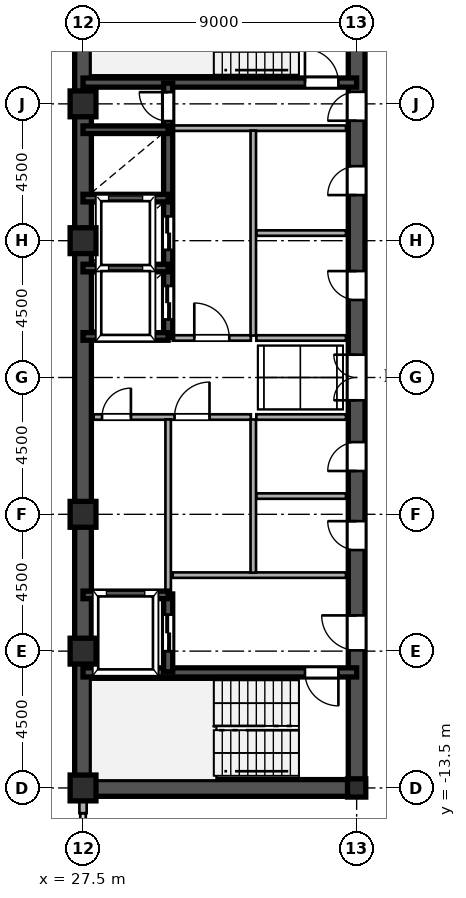
"""IFC4 building model, lengths in metres.
Left out: names, types, materials, properties, quantities, classifications, styles, units other than length and angle.
Written with IfcOpenShell. Run it as: python <this file> out.ifc"""

import sys

from ifc_helpers import new_model, si_unit, direction, frame, frame_2d, origin, origin_2d, place, context, subcontext, project, spatial, rectangle, hollow_rectangle, i_section, extrude, source, transform, mapped, element, fill, save


model = new_model("IFC4")
c1 = context("Model", 3, precision=1e-05, world=origin(), true_north=direction((0.0, 1.0)))
c2 = subcontext(c1, "Body", "Model", "MODEL_VIEW")
j1 = project(units=[si_unit("LENGTHUNIT", "METRE"), si_unit("PLANEANGLEUNIT", "RADIAN")], contexts=[c1])
p1 = place(None, origin())
s1 = spatial("IfcSite", under=j1, at=p1, CompositionType="ELEMENT")
p2 = place(p1, origin())
s2 = spatial("IfcBuilding", under=s1, at=p2, CompositionType="ELEMENT")
p3 = place(p2, frame((0.0, 0.0, 181.5)))
s3 = spatial("IfcBuildingStorey", under=s2, at=p3, CompositionType="ELEMENT", Elevation=181.5)
m1 = source(origin(), c2, "Body", "SweptSolid", [
    extrude(hollow_rectangle(XDim=0.85, YDim=0.85, WallThickness=0.036, at=origin_2d()), origin(), (0.0, 0.0, 1.0), 3.6),
])
for number, where, z_axis, x_axis in (
    (1, (27.5, -13.5, 0.0), (0.0, 0.0, 1.0), (1.0, 0.0, 0.0)),
    (2, (27.5, -9.0, 0.0), (0.0, 0.0, 1.0), (1.0, 0.0, 0.0)),
    (3, (27.5, -4.5, 0.0), (0.0, 0.0, 1.0), (1.0, 0.0, 0.0)),
    (4, (27.5, 4.5, 0.0), (0.0, 0.0, 1.0), (1.0, 0.0, 0.0)),
    (5, (27.5, 9.0, 0.0), (0.0, 0.0, 1.0), (1.0, 0.0, 0.0)),
):
    element("IfcColumn", number, at=place(p3, frame(where, z_axis=z_axis, x_axis=x_axis)), inside=s3, PredefinedType="COLUMN", context=c2, shape_type="MappedRepresentation", body=[
        mapped(m1, transform((0.0, 0.0, 0.0), scale=1.0)),
    ])
m2 = source(origin(), c2, "Body", "SweptSolid", [
    extrude(i_section(OverallWidth=0.6, OverallDepth=0.6, WebThickness=0.025, FlangeThickness=0.04, at=origin_2d()), origin(), (0.0, 0.0, 1.0), 3.6),
])
p4 = place(p3, frame((36.5, -13.5, 0.0), z_axis=(0.0, 0.0, 1.0), x_axis=(1.0, 0.0, 0.0)))
e6 = element("IfcColumn", 6, at=p4, inside=s3, PredefinedType="COLUMN", context=c2, shape_type="MappedRepresentation", body=[
    mapped(m2, transform((0.0, 0.0, 0.0), scale=1.0)),
])
p5 = place(p3, frame((27.5, -14.33, 0.0), z_axis=(0.0, 0.0, 1.0), x_axis=(0.0, 1.0, 0.0)))
e7 = element("IfcWall", 7, at=p5, inside=s3, PredefinedType="SOLIDWALL", context=c2, shape_type="SweptSolid", body=[
    extrude(rectangle(XDim=0.55, YDim=0.24, at=frame_2d((0.275, 0.0))), origin(), (0.0, 0.0, 1.0), 2.88),
])
for number, where, z_axis, x_axis in (
    (8, (27.5, -13.5, 0.0), (0.0, 0.0, 1.0), (0.0, 1.0, 0.0)),
    (9, (27.5, 1.3, 0.0), (0.0, 0.0, 1.0), (0.0, 1.0, 0.0)),
):
    element("IfcWall", number, at=place(p3, frame(where, z_axis=z_axis, x_axis=x_axis)), inside=s3, PredefinedType="SHEAR", context=c2, shape_type="SweptSolid", body=[
        extrude(rectangle(XDim=12.2, YDim=0.55, at=frame_2d((6.1, 0.0))), origin(), (0.0, 0.0, 1.0), 3.38),
    ])
p6 = place(p3, frame((27.5, -1.3, 0.0), z_axis=(0.0, 0.0, 1.0), x_axis=(0.0, 1.0, 0.0)))
e10 = element("IfcWall", 10, at=p6, inside=s3, PredefinedType="SHEAR", context=c2, shape_type="SweptSolid", body=[
    extrude(rectangle(XDim=2.6, YDim=0.55, at=frame_2d((1.3, 0.0))), origin(), (0.0, 0.0, 1.0), 3.38),
])
p7 = place(p3, frame((27.5, -13.5, 0.0), z_axis=(0.0, 0.0, 1.0), x_axis=(1.0, 0.0, 0.0)))
e11 = element("IfcWall", 11, at=p7, inside=s3, PredefinedType="SHEAR", context=c2, shape_type="SweptSolid", body=[
    extrude(rectangle(XDim=9.0, YDim=0.55, at=frame_2d((4.5, 0.0))), origin(), (0.0, 0.0, 1.0), 3.38),
])
p8 = place(p3, frame((36.5, -13.65, 0.0), z_axis=(0.0, 0.0, 1.0), x_axis=(0.0, 1.0, 0.0)))
e12 = element("IfcWall", 12, at=p8, inside=s3, PredefinedType="SHEAR", context=c2, shape_type="SweptSolid", body=[
    extrude(rectangle(XDim=7.15, YDim=0.55, at=frame_2d((3.575, 0.0))), origin(), (0.0, 0.0, 1.0), 3.38),
])
p9 = place(p8, frame((4.675, 0.0, 0.0)))
e13 = element("IfcOpeningElement", 13, at=p9, cuts=e12, PredefinedType="OPENING", context=c2, shape_type="SweptSolid", body=[
    extrude(rectangle(XDim=1.15, YDim=2.2, at=frame_2d((0.575, 1.1))), frame((0.0, 0.285, 0.0), z_axis=(0.0, -1.0, 0.0), x_axis=(1.0, 0.0, 0.0)), (0.0, 0.0, 1.0), 0.57),
])
p10 = place(p3, frame((36.5, -1.3, 0.0), z_axis=(0.0, 0.0, 1.0), x_axis=(0.0, 1.0, 0.0)))
e14 = element("IfcWall", 14, at=p10, inside=s3, PredefinedType="SHEAR", context=c2, shape_type="SweptSolid", body=[
    extrude(rectangle(XDim=2.6, YDim=0.55, at=frame_2d((1.3, 0.0))), origin(), (0.0, 0.0, 1.0), 3.38),
])
p11 = place(p10, frame((0.55, 0.0, 0.0)))
e15 = element("IfcOpeningElement", 15, at=p11, cuts=e14, PredefinedType="OPENING", context=c2, shape_type="SweptSolid", body=[
    extrude(rectangle(XDim=1.5, YDim=2.3, at=frame_2d((0.75, 1.15))), frame((0.0, 0.285, 0.0), z_axis=(0.0, -1.0, 0.0), x_axis=(1.0, 0.0, 0.0)), (0.0, 0.0, 1.0), 0.57),
])
p12 = place(p3, frame((36.5, 8.2, 0.0), z_axis=(0.0, 0.0, 1.0), x_axis=(0.0, 1.0, 0.0)))
e16 = element("IfcWall", 16, at=p12, inside=s3, PredefinedType="SHEAR", context=c2, shape_type="SweptSolid", body=[
    extrude(rectangle(XDim=5.45, YDim=0.55, at=frame_2d((2.725, 0.0))), origin(), (0.0, 0.0, 1.0), 3.38),
])
p13 = place(p12, frame((0.245, 0.0, 0.0)))
e17 = element("IfcOpeningElement", 17, at=p13, cuts=e16, PredefinedType="OPENING", context=c2, shape_type="SweptSolid", body=[
    extrude(rectangle(XDim=0.95, YDim=2.15, at=frame_2d((0.475, 1.075))), frame((0.0, 0.285, 0.0), z_axis=(0.0, -1.0, 0.0), x_axis=(1.0, 0.0, 0.0)), (0.0, 0.0, 1.0), 0.57),
])
p14 = place(p3, frame((36.5, -6.5, 0.0), z_axis=(0.0, 0.0, 1.0), x_axis=(0.0, 1.0, 0.0)))
e18 = element("IfcWall", 18, at=p14, inside=s3, PredefinedType="SHEAR", context=c2, shape_type="SweptSolid", body=[
    extrude(rectangle(XDim=2.6, YDim=0.55, at=frame_2d((1.3, 0.0))), origin(), (0.0, 0.0, 1.0), 3.38),
])
p15 = place(p14, frame((0.825, 0.0, 0.0)))
e19 = element("IfcOpeningElement", 19, at=p15, cuts=e18, PredefinedType="OPENING", context=c2, shape_type="SweptSolid", body=[
    extrude(rectangle(XDim=0.95, YDim=2.15, at=frame_2d((0.475, 1.075))), frame((0.0, 0.285, 0.0), z_axis=(0.0, -1.0, 0.0), x_axis=(1.0, 0.0, 0.0)), (0.0, 0.0, 1.0), 0.57),
])
p16 = place(p3, frame((36.5, -3.9, 0.0), z_axis=(0.0, 0.0, 1.0), x_axis=(0.0, 1.0, 0.0)))
e20 = element("IfcWall", 20, at=p16, inside=s3, PredefinedType="SHEAR", context=c2, shape_type="SweptSolid", body=[
    extrude(rectangle(XDim=2.6, YDim=0.55, at=frame_2d((1.3, 0.0))), origin(), (0.0, 0.0, 1.0), 3.38),
])
p17 = place(p16, frame((0.825, 0.0, 0.0)))
e21 = element("IfcOpeningElement", 21, at=p17, cuts=e20, PredefinedType="OPENING", context=c2, shape_type="SweptSolid", body=[
    extrude(rectangle(XDim=0.95, YDim=2.15, at=frame_2d((0.475, 1.075))), frame((0.0, 0.285, 0.0), z_axis=(0.0, -1.0, 0.0), x_axis=(1.0, 0.0, 0.0)), (0.0, 0.0, 1.0), 0.57),
])
p18 = place(p3, frame((36.5, 1.3, 0.0), z_axis=(0.0, 0.0, 1.0), x_axis=(0.0, 1.0, 0.0)))
e22 = element("IfcWall", 22, at=p18, inside=s3, PredefinedType="SHEAR", context=c2, shape_type="SweptSolid", body=[
    extrude(rectangle(XDim=3.45, YDim=0.55, at=frame_2d((1.725, 0.0))), origin(), (0.0, 0.0, 1.0), 3.38),
])
p19 = place(p18, frame((1.25, 0.0, 0.0)))
e23 = element("IfcOpeningElement", 23, at=p19, cuts=e22, PredefinedType="OPENING", context=c2, shape_type="SweptSolid", body=[
    extrude(rectangle(XDim=0.95, YDim=2.15, at=frame_2d((0.475, 1.075))), frame((0.0, 0.285, 0.0), z_axis=(0.0, -1.0, 0.0), x_axis=(1.0, 0.0, 0.0)), (0.0, 0.0, 1.0), 0.57),
])
p20 = place(p3, frame((36.5, 4.75, 0.0), z_axis=(0.0, 0.0, 1.0), x_axis=(0.0, 1.0, 0.0)))
e24 = element("IfcWall", 24, at=p20, inside=s3, PredefinedType="SHEAR", context=c2, shape_type="SweptSolid", body=[
    extrude(rectangle(XDim=3.45, YDim=0.55, at=frame_2d((1.725, 0.0))), origin(), (0.0, 0.0, 1.0), 3.38),
])
p21 = place(p20, frame((1.25, 0.0, 0.0)))
e25 = element("IfcOpeningElement", 25, at=p21, cuts=e24, PredefinedType="OPENING", context=c2, shape_type="SweptSolid", body=[
    extrude(rectangle(XDim=0.95, YDim=2.15, at=frame_2d((0.475, 1.075))), frame((0.0, 0.285, 0.0), z_axis=(0.0, -1.0, 0.0), x_axis=(1.0, 0.0, 0.0)), (0.0, 0.0, 1.0), 0.57),
])
p22 = place(p3, frame((27.5, -9.7, 0.0), z_axis=(0.0, 0.0, 1.0), x_axis=(1.0, 0.0, 0.0)))
e26 = element("IfcWall", 26, at=p22, inside=s3, PredefinedType="SHEAR", context=c2, shape_type="SweptSolid", body=[
    extrude(rectangle(XDim=9.0, YDim=0.3, at=frame_2d((4.5, 0.0))), origin(), (0.0, 0.0, 1.0), 3.38),
])
p23 = place(p22, frame((7.3, 0.0, 0.0)))
e27 = element("IfcOpeningElement", 27, at=p23, cuts=e26, PredefinedType="OPENING", context=c2, shape_type="SweptSolid", body=[
    extrude(rectangle(XDim=1.1, YDim=2.2, at=frame_2d((0.55, 1.1))), frame((0.0, 0.16, 0.0), z_axis=(0.0, -1.0, 0.0), x_axis=(1.0, 0.0, 0.0)), (0.0, 0.0, 1.0), 0.32),
])
p24 = place(p3, frame((27.5, 9.7, 0.0), z_axis=(0.0, 0.0, 1.0), x_axis=(1.0, 0.0, 0.0)))
e28 = element("IfcWall", 28, at=p24, inside=s3, PredefinedType="SHEAR", context=c2, shape_type="SweptSolid", body=[
    extrude(rectangle(XDim=9.0, YDim=0.3, at=frame_2d((4.5, 0.0))), origin(), (0.0, 0.0, 1.0), 3.38),
])
p25 = place(p24, frame((7.3, 0.0, 0.0)))
e29 = element("IfcOpeningElement", 29, at=p25, cuts=e28, PredefinedType="OPENING", context=c2, shape_type="SweptSolid", body=[
    extrude(rectangle(XDim=1.1, YDim=2.2, at=frame_2d((0.55, 1.1))), frame((0.0, 0.16, 0.0), z_axis=(0.0, -1.0, 0.0), x_axis=(1.0, 0.0, 0.0)), (0.0, 0.0, 1.0), 0.32),
])
for number, where, z_axis, x_axis in (
    (30, (27.5, -7.15, 0.0), (0.0, 0.0, 1.0), (1.0, 0.0, 0.0)),
    (31, (27.5, 1.35, 0.0), (0.0, 0.0, 1.0), (1.0, 0.0, 0.0)),
    (32, (27.5, 3.6, 0.0), (0.0, 0.0, 1.0), (1.0, 0.0, 0.0)),
    (33, (27.5, 5.9, 0.0), (0.0, 0.0, 1.0), (1.0, 0.0, 0.0)),
    (34, (27.5, 8.15, 0.0), (0.0, 0.0, 1.0), (1.0, 0.0, 0.0)),
):
    element("IfcWall", number, at=place(p3, frame(where, z_axis=z_axis, x_axis=x_axis)), inside=s3, PredefinedType="SHEAR", context=c2, shape_type="SweptSolid", body=[
        extrude(rectangle(XDim=2.8, YDim=0.25, at=frame_2d((1.4, 0.0))), origin(), (0.0, 0.0, 1.0), 3.38),
    ])
p26 = place(p3, frame((30.3, -9.68, 0.0), z_axis=(0.0, 0.0, 1.0), x_axis=(0.0, 1.0, 0.0)))
e35 = element("IfcWall", 35, at=p26, inside=s3, PredefinedType="SHEAR", context=c2, shape_type="SweptSolid", body=[
    extrude(rectangle(XDim=2.56, YDim=0.3, at=frame_2d((1.28, 0.0))), origin(), (0.0, 0.0, 1.0), 3.38),
])
p27 = place(p26, frame((0.68, 0.0, 0.0)))
e36 = element("IfcOpeningElement", 36, at=p27, cuts=e35, PredefinedType="OPENING", context=c2, shape_type="SweptSolid", body=[
    extrude(rectangle(XDim=1.2, YDim=2.25, at=frame_2d((0.6, 1.125))), frame((0.0, 0.16, 0.0), z_axis=(0.0, -1.0, 0.0), x_axis=(1.0, 0.0, 0.0)), (0.0, 0.0, 1.0), 0.32),
])
p28 = place(p3, frame((30.3, 1.32, 0.0), z_axis=(0.0, 0.0, 1.0), x_axis=(0.0, 1.0, 0.0)))
e37 = element("IfcWall", 37, at=p28, inside=s3, PredefinedType="SHEAR", context=c2, shape_type="SweptSolid", body=[
    extrude(rectangle(XDim=2.28, YDim=0.3, at=frame_2d((1.14, 0.0))), origin(), (0.0, 0.0, 1.0), 3.38),
])
p29 = place(p28, frame((0.59, 0.0, 0.0)))
e38 = element("IfcOpeningElement", 38, at=p29, cuts=e37, PredefinedType="OPENING", context=c2, shape_type="SweptSolid", body=[
    extrude(rectangle(XDim=1.1, YDim=2.2, at=frame_2d((0.55, 1.1))), frame((0.0, 0.16, 0.0), z_axis=(0.0, -1.0, 0.0), x_axis=(1.0, 0.0, 0.0)), (0.0, 0.0, 1.0), 0.32),
])
p30 = place(p3, frame((30.3, 3.6, 0.0), z_axis=(0.0, 0.0, 1.0), x_axis=(0.0, 1.0, 0.0)))
e39 = element("IfcWall", 39, at=p30, inside=s3, PredefinedType="SHEAR", context=c2, shape_type="SweptSolid", body=[
    extrude(rectangle(XDim=2.3, YDim=0.3, at=frame_2d((1.15, 0.0))), origin(), (0.0, 0.0, 1.0), 3.38),
])
p31 = place(p30, frame((0.6, 0.0, 0.0)))
e40 = element("IfcOpeningElement", 40, at=p31, cuts=e39, PredefinedType="OPENING", context=c2, shape_type="SweptSolid", body=[
    extrude(rectangle(XDim=1.1, YDim=2.2, at=frame_2d((0.55, 1.1))), frame((0.0, 0.16, 0.0), z_axis=(0.0, -1.0, 0.0), x_axis=(1.0, 0.0, 0.0)), (0.0, 0.0, 1.0), 0.32),
])
p32 = place(p3, frame((30.3, 5.9, 0.0), z_axis=(0.0, 0.0, 1.0), x_axis=(0.0, 1.0, 0.0)))
e41 = element("IfcWall", 41, at=p32, inside=s3, PredefinedType="SHEAR", context=c2, shape_type="SweptSolid", body=[
    extrude(rectangle(XDim=2.25, YDim=0.3, at=frame_2d((1.125, 0.0))), origin(), (0.0, 0.0, 1.0), 3.38),
])
p33 = place(p3, frame((30.3, 8.15, 0.0), z_axis=(0.0, 0.0, 1.0), x_axis=(0.0, 1.0, 0.0)))
e42 = element("IfcWall", 42, at=p33, inside=s3, PredefinedType="SHEAR", context=c2, shape_type="SweptSolid", body=[
    extrude(rectangle(XDim=1.53, YDim=0.3, at=frame_2d((0.765, 0.0))), origin(), (0.0, 0.0, 1.0), 3.38),
])
p34 = place(p33, frame((0.285, 0.0, 0.0)))
e43 = element("IfcOpeningElement", 43, at=p34, cuts=e42, PredefinedType="OPENING", context=c2, shape_type="SweptSolid", body=[
    extrude(rectangle(XDim=0.95, YDim=2.15, at=frame_2d((0.475, 1.075))), frame((0.0, 0.16, 0.0), z_axis=(0.0, -1.0, 0.0), x_axis=(1.0, 0.0, 0.0)), (0.0, 0.0, 1.0), 0.32),
])
for number, where, z_axis, x_axis in (
    (44, (30.45, -6.5, 0.0), (0.0, 0.0, 1.0), (1.0, 0.0, 0.0)),
    (45, (30.45, 8.2, 0.0), (0.0, 0.0, 1.0), (1.0, 0.0, 0.0)),
):
    element("IfcWall", number, at=place(p3, frame(where, z_axis=z_axis, x_axis=x_axis)), inside=s3, PredefinedType="PARTITIONING", context=c2, shape_type="SweptSolid", body=[
        extrude(rectangle(XDim=5.7, YDim=0.18, at=frame_2d((2.85, 0.0))), origin(), (0.0, 0.0, 1.0), 3.38),
    ])
p35 = place(p3, frame((33.1, -6.42, 0.0), z_axis=(0.0, 0.0, 1.0), x_axis=(0.0, 1.0, 0.0)))
e46 = element("IfcWall", 46, at=p35, inside=s3, PredefinedType="PARTITIONING", context=c2, shape_type="SweptSolid", body=[
    extrude(rectangle(XDim=5.04, YDim=0.18, at=frame_2d((2.52, 0.0))), origin(), (0.0, 0.0, 1.0), 3.38),
])
p36 = place(p3, frame((33.1, 1.38, 0.0), z_axis=(0.0, 0.0, 1.0), x_axis=(0.0, 1.0, 0.0)))
e47 = element("IfcWall", 47, at=p36, inside=s3, PredefinedType="PARTITIONING", context=c2, shape_type="SweptSolid", body=[
    extrude(rectangle(XDim=6.74, YDim=0.18, at=frame_2d((3.37, 0.0))), origin(), (0.0, 0.0, 1.0), 3.38),
])
p37 = place(p3, frame((27.85, -1.3, 0.0), z_axis=(0.0, 0.0, 1.0), x_axis=(1.0, 0.0, 0.0)))
e48 = element("IfcWall", 48, at=p37, inside=s3, PredefinedType="PARTITIONING", context=c2, shape_type="SweptSolid", body=[
    extrude(rectangle(XDim=2.45, YDim=0.18, at=frame_2d((1.225, 0.0))), origin(), (0.0, 0.0, 1.0), 3.38),
])
p38 = place(p37, frame((0.275, 0.0, 0.0)))
e49 = element("IfcOpeningElement", 49, at=p38, cuts=e48, PredefinedType="OPENING", context=c2, shape_type="SweptSolid", body=[
    extrude(rectangle(XDim=0.95, YDim=2.15, at=frame_2d((0.475, 1.075))), frame((0.0, 0.1, 0.0), z_axis=(0.0, -1.0, 0.0), x_axis=(1.0, 0.0, 0.0)), (0.0, 0.0, 1.0), 0.2),
])
p39 = place(p3, frame((30.3, -1.3, 0.0), z_axis=(0.0, 0.0, 1.0), x_axis=(1.0, 0.0, 0.0)))
e50 = element("IfcWall", 50, at=p39, inside=s3, PredefinedType="PARTITIONING", context=c2, shape_type="SweptSolid", body=[
    extrude(rectangle(XDim=2.72, YDim=0.18, at=frame_2d((1.36, 0.0))), origin(), (0.0, 0.0, 1.0), 3.38),
])
p40 = place(p39, frame((0.21, 0.0, 0.0)))
e51 = element("IfcOpeningElement", 51, at=p40, cuts=e50, PredefinedType="OPENING", context=c2, shape_type="SweptSolid", body=[
    extrude(rectangle(XDim=1.15, YDim=2.2, at=frame_2d((0.575, 1.1))), frame((0.0, 0.1, 0.0), z_axis=(0.0, -1.0, 0.0), x_axis=(1.0, 0.0, 0.0)), (0.0, 0.0, 1.0), 0.2),
])
p41 = place(p3, frame((30.3, -7.12, 0.0), z_axis=(0.0, 0.0, 1.0), x_axis=(0.0, 1.0, 0.0)))
e52 = element("IfcWall", 52, at=p41, inside=s3, PredefinedType="PARTITIONING", context=c2, shape_type="SweptSolid", body=[
    extrude(rectangle(XDim=5.74, YDim=0.18, at=frame_2d((2.87, 0.0))), origin(), (0.0, 0.0, 1.0), 3.38),
])
p42 = place(p3, frame((30.45, 1.3, 0.0), z_axis=(0.0, 0.0, 1.0), x_axis=(1.0, 0.0, 0.0)))
e53 = element("IfcWall", 53, at=p42, inside=s3, PredefinedType="PARTITIONING", context=c2, shape_type="SweptSolid", body=[
    extrude(rectangle(XDim=2.57, YDim=0.18, at=frame_2d((1.285, 0.0))), origin(), (0.0, 0.0, 1.0), 3.38),
])
p43 = place(p42, frame((0.71, 0.0, 0.0)))
e54 = element("IfcOpeningElement", 54, at=p43, cuts=e53, PredefinedType="OPENING", context=c2, shape_type="SweptSolid", body=[
    extrude(rectangle(XDim=1.15, YDim=2.2, at=frame_2d((0.575, 1.1))), frame((0.0, 0.1, 0.0), z_axis=(0.0, -1.0, 0.0), x_axis=(1.0, 0.0, 0.0)), (0.0, 0.0, 1.0), 0.2),
])
for number, where, z_axis, x_axis in (
    (55, (33.2, -1.3, 0.0), (0.0, 0.0, 1.0), (1.0, 0.0, 0.0)),
    (56, (33.2, 1.3, 0.0), (0.0, 0.0, 1.0), (1.0, 0.0, 0.0)),
    (57, (33.2, -3.9, 0.0), (0.0, 0.0, 1.0), (1.0, 0.0, 0.0)),
    (58, (33.2, 4.75, 0.0), (0.0, 0.0, 1.0), (1.0, 0.0, 0.0)),
):
    element("IfcWall", number, at=place(p3, frame(where, z_axis=z_axis, x_axis=x_axis)), inside=s3, PredefinedType="PARTITIONING", context=c2, shape_type="SweptSolid", body=[
        extrude(rectangle(XDim=2.95, YDim=0.18, at=frame_2d((1.475, 0.0))), origin(), (0.0, 0.0, 1.0), 3.38),
    ])
m3 = source(origin(), c2, "Body", "SweptSolid", [
    extrude(rectangle(XDim=1.15, YDim=2.2, at=frame_2d((0.575, 1.1))), frame((0.0, 0.025, 0.0), z_axis=(0.0, -1.0, 0.0), x_axis=(1.0, 0.0, 0.0)), (0.0, 0.0, 1.0), 0.05),
])
p44 = place(p9, origin())
e59 = element("IfcDoor", 59, at=p44, inside=s3, OperationType="SINGLE_SWING_RIGHT", PredefinedType="DOOR", context=c2, shape_type="MappedRepresentation", body=[
    mapped(m3, transform((0.0, 0.0, 0.0), scale=1.0)),
])
fill(e13, e59)
m4 = source(origin(), c2, "Body", "SweptSolid", [
    extrude(rectangle(XDim=1.5, YDim=2.3, at=frame_2d((0.75, 1.15))), frame((0.0, 0.025, 0.0), z_axis=(0.0, -1.0, 0.0), x_axis=(1.0, 0.0, 0.0)), (0.0, 0.0, 1.0), 0.05),
])
p45 = place(p11, origin())
e60 = element("IfcDoor", 60, at=p45, inside=s3, OperationType="DOUBLE_SWING_LEFT", PredefinedType="DOOR", context=c2, shape_type="MappedRepresentation", body=[
    mapped(m4, transform((0.0, 0.0, 0.0), scale=1.0)),
])
fill(e15, e60)
m5 = source(origin(), c2, "Body", "SweptSolid", [
    extrude(rectangle(XDim=0.95, YDim=2.15, at=frame_2d((0.475, 1.075))), frame((0.0, 0.025, 0.0), z_axis=(0.0, -1.0, 0.0), x_axis=(1.0, 0.0, 0.0)), (0.0, 0.0, 1.0), 0.05),
])
p46 = place(p13, origin())
e61 = element("IfcDoor", 61, at=p46, inside=s3, OperationType="SINGLE_SWING_LEFT", PredefinedType="DOOR", context=c2, shape_type="MappedRepresentation", body=[
    mapped(m5, transform((0.0, 0.0, 0.0), scale=1.0)),
])
fill(e17, e61)
p47 = place(p15, origin())
e62 = element("IfcDoor", 62, at=p47, inside=s3, OperationType="SINGLE_SWING_RIGHT", PredefinedType="DOOR", context=c2, shape_type="MappedRepresentation", body=[
    mapped(m5, transform((0.0, 0.0, 0.0), scale=1.0)),
])
fill(e19, e62)
p48 = place(p17, origin())
e63 = element("IfcDoor", 63, at=p48, inside=s3, OperationType="SINGLE_SWING_LEFT", PredefinedType="DOOR", context=c2, shape_type="MappedRepresentation", body=[
    mapped(m5, transform((0.0, 0.0, 0.0), scale=1.0)),
])
fill(e21, e63)
p49 = place(p19, origin())
e64 = element("IfcDoor", 64, at=p49, inside=s3, OperationType="SINGLE_SWING_RIGHT", PredefinedType="DOOR", context=c2, shape_type="MappedRepresentation", body=[
    mapped(m5, transform((0.0, 0.0, 0.0), scale=1.0)),
])
fill(e23, e64)
p50 = place(p21, origin())
e65 = element("IfcDoor", 65, at=p50, inside=s3, OperationType="SINGLE_SWING_LEFT", PredefinedType="DOOR", context=c2, shape_type="MappedRepresentation", body=[
    mapped(m5, transform((0.0, 0.0, 0.0), scale=1.0)),
])
fill(e25, e65)
m6 = source(origin(), c2, "Body", "SweptSolid", [
    extrude(rectangle(XDim=1.1, YDim=2.2, at=frame_2d((0.55, 1.1))), frame((0.0, 0.025, 0.0), z_axis=(0.0, -1.0, 0.0), x_axis=(1.0, 0.0, 0.0)), (0.0, 0.0, 1.0), 0.05),
])
p51 = place(p23, frame((1.1, 0.0, 0.0), z_axis=(0.0, 0.0, 1.0), x_axis=(-1.0, 0.0, 0.0)))
e66 = element("IfcDoor", 66, at=p51, inside=s3, OperationType="SINGLE_SWING_RIGHT", PredefinedType="DOOR", context=c2, shape_type="MappedRepresentation", body=[
    mapped(m6, transform((0.0, 0.0, 0.0), scale=1.0)),
])
fill(e27, e66)
p52 = place(p25, origin())
e67 = element("IfcDoor", 67, at=p52, inside=s3, OperationType="SINGLE_SWING_LEFT", PredefinedType="DOOR", context=c2, shape_type="MappedRepresentation", body=[
    mapped(m6, transform((0.0, 0.0, 0.0), scale=1.0)),
])
fill(e29, e67)
m7 = source(origin(), c2, "Body", "SweptSolid", [
    extrude(rectangle(XDim=1.2, YDim=2.25, at=frame_2d((0.6, 1.125))), frame((0.0, 0.025, 0.0), z_axis=(0.0, -1.0, 0.0), x_axis=(1.0, 0.0, 0.0)), (0.0, 0.0, 1.0), 0.05),
])
p53 = place(p27, origin())
e68 = element("IfcDoor", 68, at=p53, inside=s3, OperationType="DOUBLE_DOOR_SLIDING", PredefinedType="DOOR", context=c2, shape_type="MappedRepresentation", body=[
    mapped(m7, transform((0.0, 0.0, 0.0), scale=1.0)),
])
fill(e36, e68)
m8 = source(origin(), c2, "Body", "SweptSolid", [
    extrude(rectangle(XDim=1.1, YDim=2.2, at=frame_2d((0.55, 1.1))), frame((0.0, 0.025, 0.0), z_axis=(0.0, -1.0, 0.0), x_axis=(1.0, 0.0, 0.0)), (0.0, 0.0, 1.0), 0.05),
])
p54 = place(p29, origin())
e69 = element("IfcDoor", 69, at=p54, inside=s3, OperationType="DOUBLE_DOOR_SLIDING", PredefinedType="DOOR", context=c2, shape_type="MappedRepresentation", body=[
    mapped(m8, transform((0.0, 0.0, 0.0), scale=1.0)),
])
fill(e38, e69)
p55 = place(p31, origin())
e70 = element("IfcDoor", 70, at=p55, inside=s3, OperationType="DOUBLE_DOOR_SLIDING", PredefinedType="DOOR", context=c2, shape_type="MappedRepresentation", body=[
    mapped(m8, transform((0.0, 0.0, 0.0), scale=1.0)),
])
fill(e40, e70)
p56 = place(p34, origin())
e71 = element("IfcDoor", 71, at=p56, inside=s3, OperationType="SINGLE_SWING_RIGHT", PredefinedType="DOOR", context=c2, shape_type="MappedRepresentation", body=[
    mapped(m5, transform((0.0, 0.0, 0.0), scale=1.0)),
])
fill(e43, e71)
p57 = place(p38, origin())
e72 = element("IfcDoor", 72, at=p57, inside=s3, OperationType="SINGLE_SWING_RIGHT", PredefinedType="DOOR", context=c2, shape_type="MappedRepresentation", body=[
    mapped(m5, transform((0.0, 0.0, 0.0), scale=1.0)),
])
fill(e49, e72)
p58 = place(p40, origin())
e73 = element("IfcDoor", 73, at=p58, inside=s3, OperationType="SINGLE_SWING_RIGHT", PredefinedType="DOOR", context=c2, shape_type="MappedRepresentation", body=[
    mapped(m3, transform((0.0, 0.0, 0.0), scale=1.0)),
])
fill(e51, e73)
p59 = place(p43, origin())
e74 = element("IfcDoor", 74, at=p59, inside=s3, OperationType="SINGLE_SWING_LEFT", PredefinedType="DOOR", context=c2, shape_type="MappedRepresentation", body=[
    mapped(m3, transform((0.0, 0.0, 0.0), scale=1.0)),
])
fill(e54, e74)
save(model, sys.argv[1])
